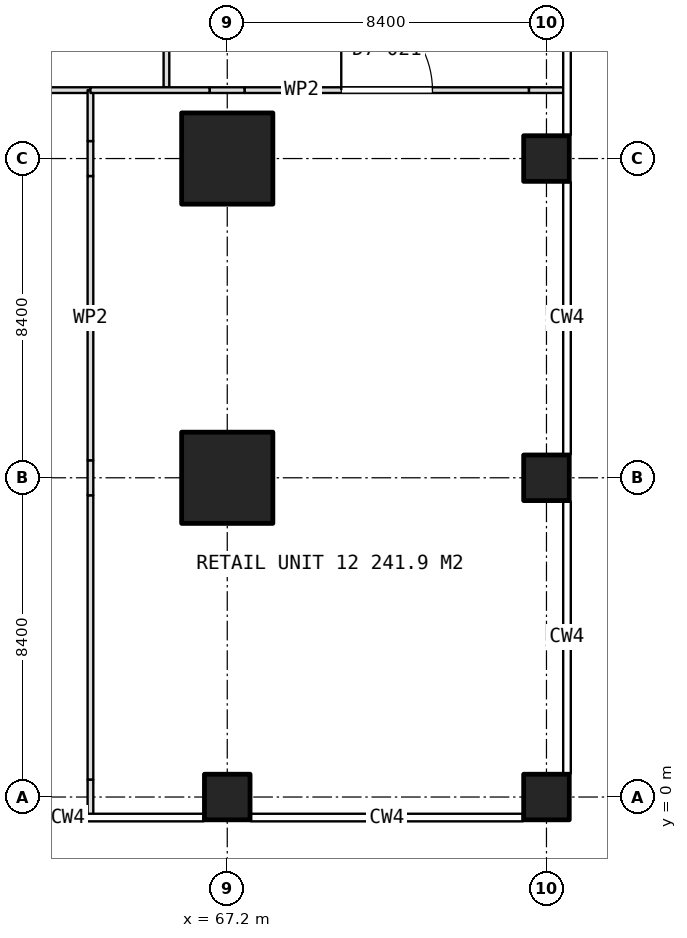
"""IFC4 building model, lengths in metres.
Left out: names, types, materials, properties, quantities, classifications, styles, units other than length and angle.
Written with IfcOpenShell. Run it as: python <this file> out.ifc"""

import sys

from ifc_helpers import new_model, si_unit, direction, frame, frame_2d, origin, origin_2d, place, context, subcontext, project, spatial, rectangle, extrude, element, fill, save


model = new_model("IFC4")
c1 = context("Model", 3, precision=1e-05, world=origin(), true_north=direction((0.0, 1.0)))
c2 = subcontext(c1, "Body", "Model", "MODEL_VIEW")
j1 = project(units=[si_unit("LENGTHUNIT", "METRE"), si_unit("PLANEANGLEUNIT", "RADIAN")], contexts=[c1])
p1 = place(None, origin())
s1 = spatial("IfcSite", under=j1, at=p1, CompositionType="ELEMENT")
p2 = place(p1, origin())
s2 = spatial("IfcBuilding", under=s1, at=p2, CompositionType="ELEMENT")
p3 = place(p2, frame((0.0, 0.0, 10.4)))
s3 = spatial("IfcBuildingStorey", under=s2, at=p3, CompositionType="ELEMENT", Elevation=10.4)
p4 = place(p3, frame((67.2, 0.0, 0.0), z_axis=(0.0, 0.0, 1.0), x_axis=(1.0, 0.0, 0.0)))
e1 = element("IfcColumn", 1, at=p4, inside=s3, PredefinedType="COLUMN", context=c2, shape_type="SweptSolid", body=[
    extrude(rectangle(XDim=1.2, YDim=1.2, at=origin_2d()), origin(), (0.0, 0.0, 1.0), 5.0),
])
for number, where, z_axis, x_axis in (
    (2, (67.2, 8.4, 0.0), (0.0, 0.0, 1.0), (1.0, 0.0, 0.0)),
    (3, (67.2, 16.8, 0.0), (0.0, 0.0, 1.0), (1.0, 0.0, 0.0)),
):
    element("IfcColumn", number, at=place(p3, frame(where, z_axis=z_axis, x_axis=x_axis)), inside=s3, PredefinedType="COLUMN", context=c2, shape_type="SweptSolid", body=[
        extrude(rectangle(XDim=2.4, YDim=2.4, at=origin_2d()), origin(), (0.0, 0.0, 1.0), 5.0),
    ])
for number, where, z_axis, x_axis in (
    (4, (75.6, 0.0, 0.0), (0.0, 0.0, 1.0), (1.0, 0.0, 0.0)),
    (5, (75.6, 8.4, 0.0), (0.0, 0.0, 1.0), (1.0, 0.0, 0.0)),
    (6, (75.6, 16.8, 0.0), (0.0, 0.0, 1.0), (1.0, 0.0, 0.0)),
):
    element("IfcColumn", number, at=place(p3, frame(where, z_axis=z_axis, x_axis=x_axis)), inside=s3, PredefinedType="COLUMN", context=c2, shape_type="SweptSolid", body=[
        extrude(rectangle(XDim=1.2, YDim=1.2, at=origin_2d()), origin(), (0.0, 0.0, 1.0), 5.0),
    ])
p5 = place(p3, frame((63.6, -0.49, 0.0), z_axis=(0.0, 0.0, 1.0), x_axis=(0.0, 1.0, 0.0)))
e7 = element("IfcWall", 7, at=p5, inside=s3, PredefinedType="PARTITIONING", context=c2, shape_type="SweptSolid", body=[
    extrude(rectangle(XDim=0.95, YDim=0.15, at=frame_2d((0.475, 0.0))), origin(), (0.0, 0.0, 1.0), 2.9),
])
p6 = place(p3, frame((63.6, 0.46, 0.0), z_axis=(0.0, 0.0, 1.0), x_axis=(0.0, 1.0, 0.0)))
e8 = element("IfcWall", 8, at=p6, inside=s3, PredefinedType="PARTITIONING", context=c2, shape_type="SweptSolid", body=[
    extrude(rectangle(XDim=7.48, YDim=0.15, at=frame_2d((3.74, 0.0))), origin(), (0.0, 0.0, 1.0), 4.7),
])
p7 = place(p3, frame((63.6, 7.94, 0.0), z_axis=(0.0, 0.0, 1.0), x_axis=(0.0, 1.0, 0.0)))
e9 = element("IfcWall", 9, at=p7, inside=s3, PredefinedType="PARTITIONING", context=c2, shape_type="SweptSolid", body=[
    extrude(rectangle(XDim=0.92, YDim=0.15, at=frame_2d((0.46, 0.0))), origin(), (0.0, 0.0, 1.0), 2.9),
])
p8 = place(p3, frame((63.6, 8.86, 0.0), z_axis=(0.0, 0.0, 1.0), x_axis=(0.0, 1.0, 0.0)))
e10 = element("IfcWall", 10, at=p8, inside=s3, PredefinedType="PARTITIONING", context=c2, shape_type="SweptSolid", body=[
    extrude(rectangle(XDim=7.48, YDim=0.15, at=frame_2d((3.74, 0.0))), origin(), (0.0, 0.0, 1.0), 4.7),
])
p9 = place(p3, frame((63.6, 16.34, 0.0), z_axis=(0.0, 0.0, 1.0), x_axis=(0.0, 1.0, 0.0)))
e11 = element("IfcWall", 11, at=p9, inside=s3, PredefinedType="PARTITIONING", context=c2, shape_type="SweptSolid", body=[
    extrude(rectangle(XDim=0.92, YDim=0.15, at=frame_2d((0.46, 0.0))), origin(), (0.0, 0.0, 1.0), 2.9),
])
p10 = place(p3, frame((63.6, 17.26, 0.0), z_axis=(0.0, 0.0, 1.0), x_axis=(0.0, 1.0, 0.0)))
e12 = element("IfcWall", 12, at=p10, inside=s3, PredefinedType="PARTITIONING", context=c2, shape_type="SweptSolid", body=[
    extrude(rectangle(XDim=1.34, YDim=0.15, at=frame_2d((0.67, 0.0))), origin(), (0.0, 0.0, 1.0), 4.7),
])
p11 = place(p3, frame((63.6, 18.6, 0.0), z_axis=(0.0, 0.0, 1.0), x_axis=(1.0, 0.0, 0.0)))
e13 = element("IfcWall", 13, at=p11, inside=s3, PredefinedType="PARTITIONING", context=c2, shape_type="SweptSolid", body=[
    extrude(rectangle(XDim=3.14, YDim=0.15, at=frame_2d((1.57, 0.0))), origin(), (0.0, 0.0, 1.0), 4.7),
])
p12 = place(p3, frame((66.74, 18.6, 0.0), z_axis=(0.0, 0.0, 1.0), x_axis=(1.0, 0.0, 0.0)))
e14 = element("IfcWall", 14, at=p12, inside=s3, PredefinedType="PARTITIONING", context=c2, shape_type="SweptSolid", body=[
    extrude(rectangle(XDim=0.92, YDim=0.15, at=frame_2d((0.46, 0.0))), origin(), (0.0, 0.0, 1.0), 2.9),
])
p13 = place(p3, frame((67.66, 18.6, 0.0), z_axis=(0.0, 0.0, 1.0), x_axis=(1.0, 0.0, 0.0)))
e15 = element("IfcWall", 15, at=p13, inside=s3, PredefinedType="PARTITIONING", context=c2, shape_type="SweptSolid", body=[
    extrude(rectangle(XDim=7.48, YDim=0.15, at=frame_2d((3.74, 0.0))), origin(), (0.0, 0.0, 1.0), 4.7),
])
p14 = place(p13, frame((2.54, 0.0, 0.0)))
e16 = element("IfcOpeningElement", 16, at=p14, cuts=e15, PredefinedType="OPENING", context=c2, shape_type="SweptSolid", body=[
    extrude(rectangle(XDim=2.4, YDim=2.4, at=frame_2d((1.2, 1.2))), frame((0.0, 0.085, 0.0), z_axis=(0.0, -1.0, 0.0), x_axis=(1.0, 0.0, 0.0)), (0.0, 0.0, 1.0), 0.17),
])
p15 = place(p3, frame((75.14, 18.6, 0.0), z_axis=(0.0, 0.0, 1.0), x_axis=(1.0, 0.0, 0.0)))
e17 = element("IfcWall", 17, at=p15, inside=s3, PredefinedType="PARTITIONING", context=c2, shape_type="SweptSolid", body=[
    extrude(rectangle(XDim=0.95, YDim=0.15, at=frame_2d((0.475, 0.0))), origin(), (0.0, 0.0, 1.0), 2.9),
])
p16 = place(p3, frame((65.6, 24.74, 0.0), z_axis=(0.0, 0.0, 1.0), x_axis=(0.0, -1.0, 0.0)))
e18 = element("IfcWall", 18, at=p16, inside=s3, PredefinedType="PARTITIONING", context=c2, shape_type="SweptSolid", body=[
    extrude(rectangle(XDim=6.065, YDim=0.15, at=frame_2d((3.032, 0.0))), origin(), (0.0, 0.0, 1.0), 4.7),
])
p17 = place(p3, frame((63.6, 18.6, 0.0), z_axis=(0.0, 0.0, 1.0), x_axis=(-1.0, 0.0, 0.0)))
e19 = element("IfcWall", 19, at=p17, inside=s3, PredefinedType="PARTITIONING", context=c2, shape_type="SweptSolid", body=[
    extrude(rectangle(XDim=4.34, YDim=0.15, at=frame_2d((2.17, 0.0))), origin(), (0.0, 0.0, 1.0), 4.7),
])
p18 = place(p14, origin())
e20 = element("IfcDoor", 20, at=p18, inside=s3, OperationType="DOUBLE_DOOR_SINGLE_SWING", PredefinedType="DOOR", context=c2, shape_type="SweptSolid", body=[
    extrude(rectangle(XDim=2.4, YDim=2.4, at=frame_2d((1.2, 1.2))), frame((0.0, 0.025, 0.0), z_axis=(0.0, -1.0, 0.0), x_axis=(1.0, 0.0, 0.0)), (0.0, 0.0, 1.0), 0.05),
])
fill(e16, e20)
save(model, sys.argv[1])
